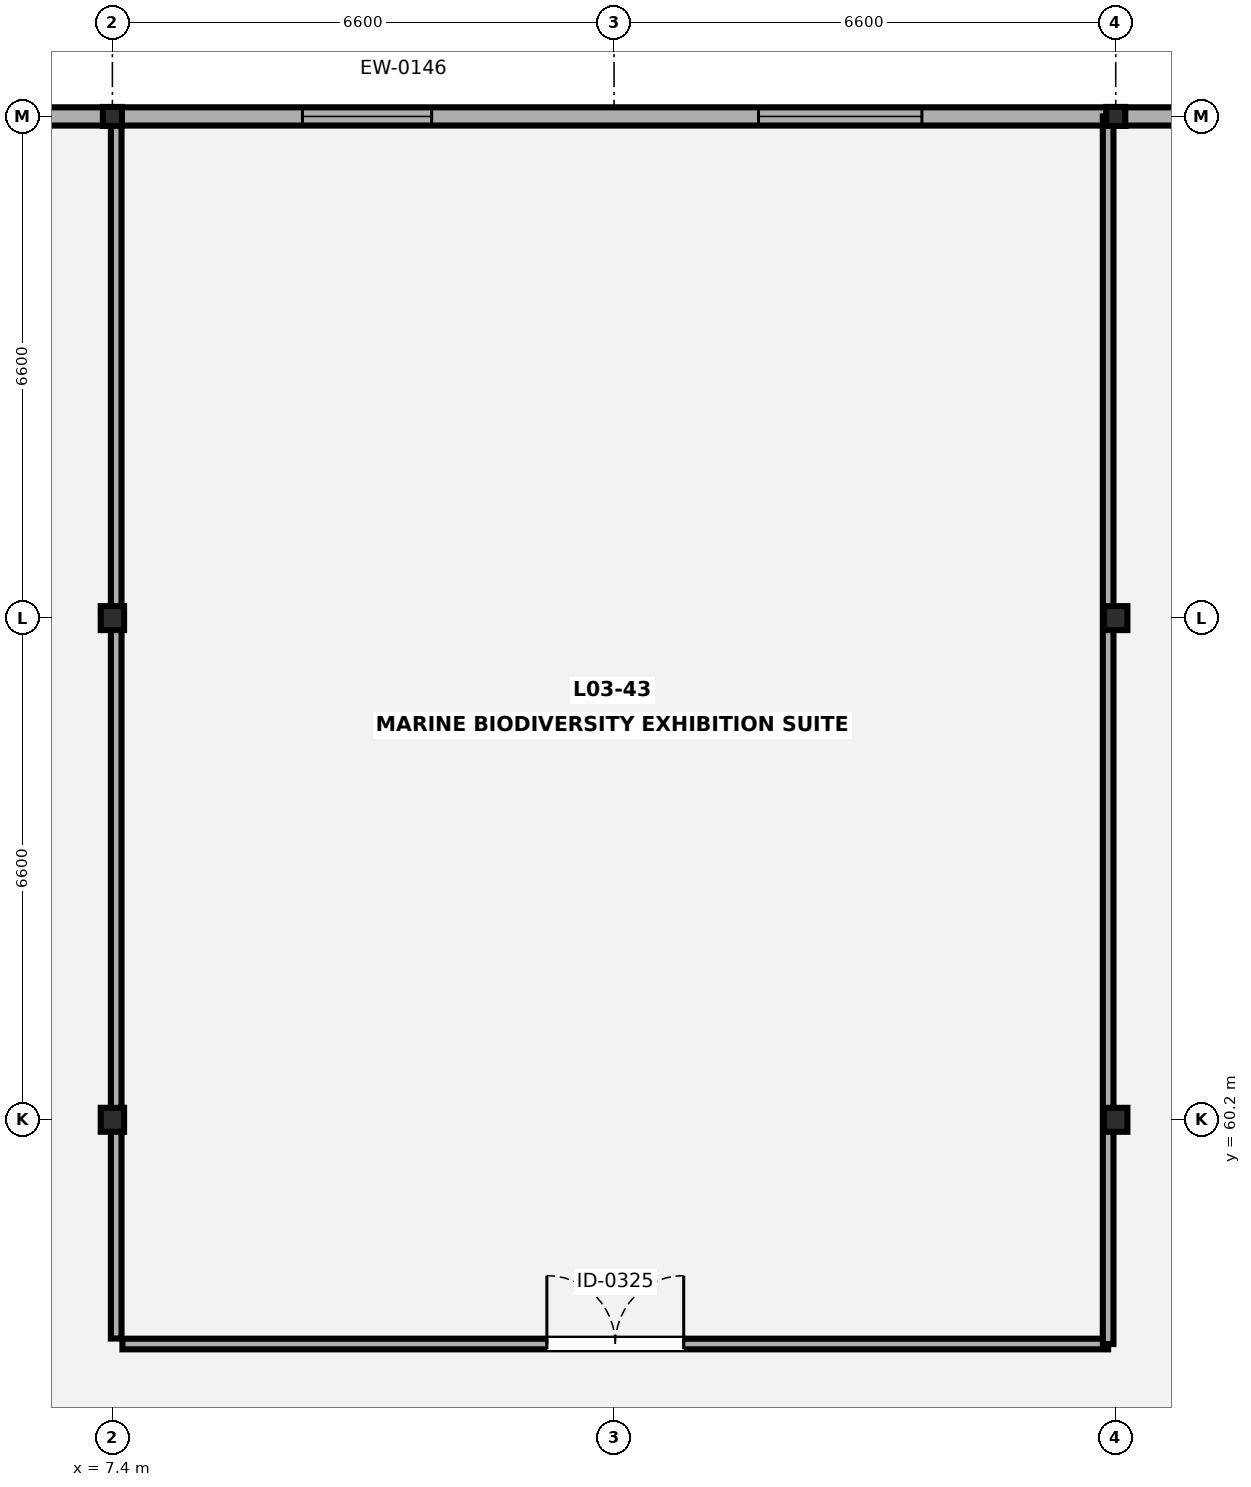
"""IFC4 building model, lengths in metres.
Left out: names, types, materials, properties, quantities, classifications, styles, units other than length and angle.
Written with IfcOpenShell. Run it as: python <this file> out.ifc"""

import sys

from ifc_helpers import new_model, si_unit, direction, frame, frame_2d, origin, origin_2d, place, context, subcontext, project, spatial, rectangle, hollow_rectangle, i_section, extrude, element, fill, save


model = new_model("IFC4")
c1 = context("Model", 3, precision=1e-05, world=origin(), true_north=direction((0.0, 1.0)))
c2 = subcontext(c1, "Body", "Model", "MODEL_VIEW")
j1 = project(units=[si_unit("LENGTHUNIT", "METRE"), si_unit("PLANEANGLEUNIT", "RADIAN")], contexts=[c1])
p1 = place(None, origin())
s1 = spatial("IfcSite", under=j1, at=p1, CompositionType="ELEMENT")
p2 = place(p1, origin())
s2 = spatial("IfcBuilding", under=s1, at=p2, CompositionType="ELEMENT")
p3 = place(p2, frame((0.0, 0.0, 13.3)))
s3 = spatial("IfcBuildingStorey", under=s2, at=p3, CompositionType="ELEMENT", Elevation=13.3)
for number, where, z_axis, x_axis in (
    (1, (7.4, 60.2, 0.0), (0.0, 0.0, 1.0), (1.0, 0.0, 0.0)),
    (2, (7.4, 66.8, 0.0), (0.0, 0.0, 1.0), (1.0, 0.0, 0.0)),
):
    element("IfcColumn", number, at=place(p3, frame(where, z_axis=z_axis, x_axis=x_axis)), inside=s3, PredefinedType="COLUMN", context=c2, shape_type="SweptSolid", body=[
        extrude(i_section(OverallWidth=0.307, OverallDepth=0.315, WebThickness=0.012, FlangeThickness=0.019, FilletRadius=0.017, at=origin_2d()), origin(), (0.0, 0.0, 1.0), 3.92),
    ])
p4 = place(p3, frame((7.4, 73.4, 0.0), z_axis=(0.0, 0.0, 1.0), x_axis=(1.0, 0.0, 0.0)))
e3 = element("IfcColumn", 3, at=p4, inside=s3, PredefinedType="COLUMN", context=c2, shape_type="SweptSolid", body=[
    extrude(hollow_rectangle(XDim=0.25, YDim=0.25, WallThickness=0.012, at=origin_2d()), origin(), (0.0, 0.0, 1.0), 3.92),
])
for number, where, z_axis, x_axis in (
    (4, (20.6, 60.2, 0.0), (0.0, 0.0, 1.0), (1.0, 0.0, 0.0)),
    (5, (20.6, 66.8, 0.0), (0.0, 0.0, 1.0), (1.0, 0.0, 0.0)),
):
    element("IfcColumn", number, at=place(p3, frame(where, z_axis=z_axis, x_axis=x_axis)), inside=s3, PredefinedType="COLUMN", context=c2, shape_type="SweptSolid", body=[
        extrude(i_section(OverallWidth=0.307, OverallDepth=0.315, WebThickness=0.012, FlangeThickness=0.019, FilletRadius=0.017, at=origin_2d()), origin(), (0.0, 0.0, 1.0), 3.92),
    ])
p5 = place(p3, frame((20.6, 73.4, 0.0), z_axis=(0.0, 0.0, 1.0), x_axis=(1.0, 0.0, 0.0)))
e6 = element("IfcColumn", 6, at=p5, inside=s3, PredefinedType="COLUMN", context=c2, shape_type="SweptSolid", body=[
    extrude(hollow_rectangle(XDim=0.25, YDim=0.25, WallThickness=0.012, at=origin_2d()), origin(), (0.0, 0.0, 1.0), 3.92),
])
p6 = place(p3, frame((1.923, 73.4, 0.0), z_axis=(0.0, 0.0, 1.0), x_axis=(1.0, 0.0, 0.0)))
e7 = element("IfcWall", 7, at=p6, inside=s3, PredefinedType="SOLIDWALL", context=c2, shape_type="SweptSolid", body=[
    extrude(rectangle(XDim=25.154, YDim=0.24, at=frame_2d((12.577, 0.0))), origin(), (0.0, 0.0, 1.0), 3.505),
])
p7 = place(p6, frame((7.977, 0.0, 0.85)))
e8 = element("IfcOpeningElement", 8, at=p7, cuts=e7, PredefinedType="OPENING", context=c2, shape_type="SweptSolid", body=[
    extrude(rectangle(XDim=1.7, YDim=1.4, at=frame_2d((0.85, 0.7))), frame((0.0, 0.13, 0.0), z_axis=(0.0, -1.0, 0.0), x_axis=(1.0, 0.0, 0.0)), (0.0, 0.0, 1.0), 0.26),
])
p8 = place(p6, frame((13.977, 0.0, 0.85)))
e9 = element("IfcOpeningElement", 9, at=p8, cuts=e7, PredefinedType="OPENING", context=c2, shape_type="SweptSolid", body=[
    extrude(rectangle(XDim=2.15, YDim=1.4, at=frame_2d((1.075, 0.7))), frame((0.0, 0.13, 0.0), z_axis=(0.0, -1.0, 0.0), x_axis=(1.0, 0.0, 0.0)), (0.0, 0.0, 1.0), 0.26),
])
p9 = place(p3, frame((7.532, 57.25, 0.0), z_axis=(0.0, 0.0, 1.0), x_axis=(1.0, 0.0, 0.0)))
e10 = element("IfcWall", 10, at=p9, inside=s3, PredefinedType="PARTITIONING", context=c2, shape_type="SweptSolid", body=[
    extrude(rectangle(XDim=12.968, YDim=0.14, at=frame_2d((6.484, 0.0))), origin(), (0.0, 0.0, 1.0), 4.0),
])
p10 = place(p9, frame((5.584, 0.0, 0.0)))
e11 = element("IfcOpeningElement", 11, at=p10, cuts=e10, PredefinedType="OPENING", context=c2, shape_type="SweptSolid", body=[
    extrude(rectangle(XDim=1.8, YDim=2.2, at=frame_2d((0.9, 1.1))), frame((0.0, 0.08, 0.0), z_axis=(0.0, -1.0, 0.0), x_axis=(1.0, 0.0, 0.0)), (0.0, 0.0, 1.0), 0.16),
])
p11 = place(p3, frame((7.45, 57.322, 0.0), z_axis=(0.0, 0.0, 1.0), x_axis=(0.0, 1.0, 0.0)))
e12 = element("IfcWall", 12, at=p11, inside=s3, PredefinedType="PARTITIONING", context=c2, shape_type="SweptSolid", body=[
    extrude(rectangle(XDim=16.078, YDim=0.14, at=frame_2d((8.039, 0.0))), origin(), (0.0, 0.0, 1.0), 3.445),
])
p12 = place(p3, frame((20.5, 57.25, 0.0), z_axis=(0.0, 0.0, 1.0), x_axis=(0.0, 1.0, 0.0)))
e13 = element("IfcWall", 13, at=p12, inside=s3, PredefinedType="PARTITIONING", context=c2, shape_type="SweptSolid", body=[
    extrude(rectangle(XDim=16.15, YDim=0.14, at=frame_2d((8.075, 0.0))), origin(), (0.0, 0.0, 1.0), 3.445),
])
p13 = place(p7, origin())
e14 = element("IfcWindow", 14, at=p13, inside=s3, PartitioningType="SINGLE_PANEL", PredefinedType="WINDOW", context=c2, shape_type="SweptSolid", body=[
    extrude(rectangle(XDim=1.7, YDim=1.4, at=frame_2d((0.85, 0.7))), frame((0.0, 0.03, 0.0), z_axis=(0.0, -1.0, 0.0), x_axis=(1.0, 0.0, 0.0)), (0.0, 0.0, 1.0), 0.06),
])
fill(e8, e14)
p14 = place(p8, origin())
e15 = element("IfcWindow", 15, at=p14, inside=s3, PartitioningType="SINGLE_PANEL", PredefinedType="WINDOW", context=c2, shape_type="SweptSolid", body=[
    extrude(rectangle(XDim=2.15, YDim=1.4, at=frame_2d((1.075, 0.7))), frame((0.0, 0.03, 0.0), z_axis=(0.0, -1.0, 0.0), x_axis=(1.0, 0.0, 0.0)), (0.0, 0.0, 1.0), 0.06),
])
fill(e9, e15)
p15 = place(p10, origin())
e16 = element("IfcDoor", 16, at=p15, inside=s3, OperationType="DOUBLE_DOOR_SINGLE_SWING", PredefinedType="DOOR", context=c2, shape_type="SweptSolid", body=[
    extrude(rectangle(XDim=1.8, YDim=2.2, at=frame_2d((0.9, 1.1))), frame((0.0, 0.025, 0.0), z_axis=(0.0, -1.0, 0.0), x_axis=(1.0, 0.0, 0.0)), (0.0, 0.0, 1.0), 0.05),
])
fill(e11, e16)
save(model, sys.argv[1])
